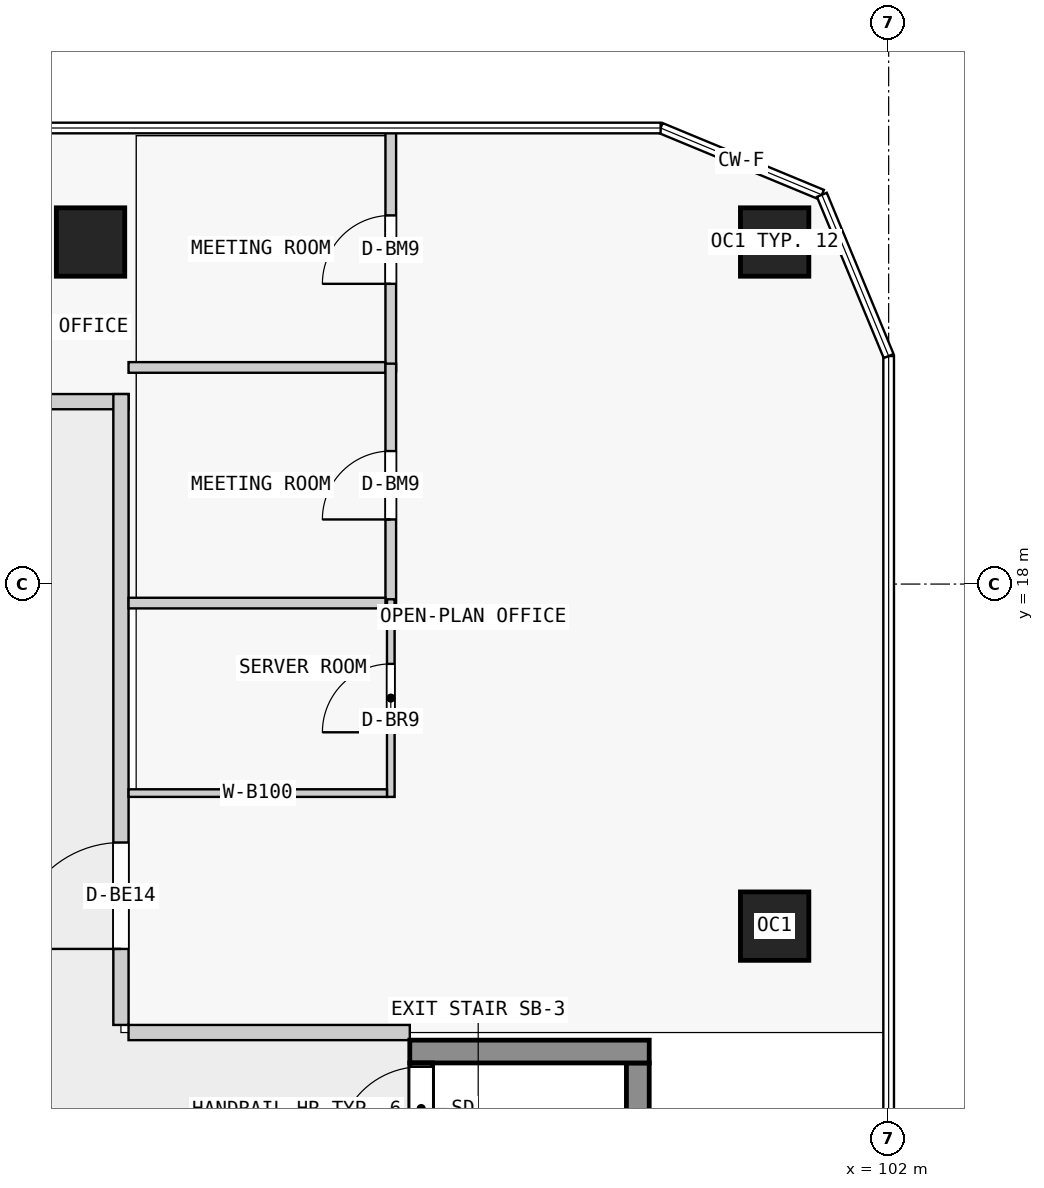
"""IFC4 building model, lengths in metres.
Left out: names, types, materials, properties, quantities, classifications, styles, units other than length and angle.
Written with IfcOpenShell. Run it as: python <this file> out.ifc"""

import sys

from ifc_helpers import new_model, si_unit, direction, frame, frame_2d, origin, origin_2d, place, context, subcontext, project, spatial, rectangle, extrude, element, fill, save


model = new_model("IFC4")
c1 = context("Model", 3, precision=1e-05, world=origin(), true_north=direction((0.0, 1.0)))
c2 = subcontext(c1, "Body", "Model", "MODEL_VIEW")
j1 = project(units=[si_unit("LENGTHUNIT", "METRE"), si_unit("PLANEANGLEUNIT", "RADIAN")], contexts=[c1])
p1 = place(None, origin())
s1 = spatial("IfcSite", under=j1, at=p1, CompositionType="ELEMENT")
p2 = place(p1, origin())
s2 = spatial("IfcBuilding", under=s1, at=p2, CompositionType="ELEMENT")
p3 = place(p2, frame((0.0, 0.0, 44.3)))
s3 = spatial("IfcBuildingStorey", under=s2, at=p3, CompositionType="ELEMENT", Elevation=44.3)
for number, where, z_axis, x_axis in (
    (1, (100.5, 13.5, 0.0), (0.0, 0.0, 1.0), (1.0, 0.0, 0.0)),
    (2, (100.5, 22.5, 0.0), (0.0, 0.0, 1.0), (1.0, 0.0, 0.0)),
    (3, (91.5, 22.5, 0.0), (0.0, 0.0, 1.0), (1.0, 0.0, 0.0)),
):
    element("IfcColumn", number, at=place(p3, frame(where, z_axis=z_axis, x_axis=x_axis)), inside=s3, PredefinedType="COLUMN", context=c2, shape_type="SweptSolid", body=[
        extrude(rectangle(XDim=0.9, YDim=0.9, at=origin_2d()), origin(), (0.0, 0.0, 1.0), 3.5),
    ])
p4 = place(p3, frame((95.85, 5.3, 0.0), z_axis=(0.0, 0.0, 1.0), x_axis=(0.0, 1.0, 0.0)))
e4 = element("IfcWall", 4, at=p4, inside=s3, PredefinedType="SHEAR", context=c2, shape_type="SweptSolid", body=[
    extrude(rectangle(XDim=6.4, YDim=0.3, at=frame_2d((3.2, 0.0))), origin(), (0.0, 0.0, 1.0), 3.25),
])
p5 = place(p4, frame((5.25, 0.0, 0.0)))
e5 = element("IfcOpeningElement", 5, at=p5, cuts=e4, PredefinedType="OPENING", context=c2, shape_type="SweptSolid", body=[
    extrude(rectangle(XDim=1.1, YDim=2.1, at=frame_2d((0.55, 1.05))), frame((0.0, 0.16, 0.0), z_axis=(0.0, -1.0, 0.0), x_axis=(1.0, 0.0, 0.0)), (0.0, 0.0, 1.0), 0.32),
])
p6 = place(p3, frame((98.7, 5.3, 0.0), z_axis=(0.0, 0.0, 1.0), x_axis=(0.0, 1.0, 0.0)))
e6 = element("IfcWall", 6, at=p6, inside=s3, PredefinedType="SHEAR", context=c2, shape_type="SweptSolid", body=[
    extrude(rectangle(XDim=6.4, YDim=0.3, at=frame_2d((3.2, 0.0))), origin(), (0.0, 0.0, 1.0), 3.25),
])
p7 = place(p3, frame((95.7, 11.85, 0.0), z_axis=(0.0, 0.0, 1.0), x_axis=(1.0, 0.0, 0.0)))
e7 = element("IfcWall", 7, at=p7, inside=s3, PredefinedType="SHEAR", context=c2, shape_type="SweptSolid", body=[
    extrude(rectangle(XDim=3.15, YDim=0.3, at=frame_2d((1.575, 0.0))), origin(), (0.0, 0.0, 1.0), 3.25),
])
p8 = place(p3, frame((72.0, 20.4, 0.0), z_axis=(0.0, 0.0, 1.0), x_axis=(1.0, 0.0, 0.0)))
e8 = element("IfcWall", 8, at=p8, inside=s3, PredefinedType="PARTITIONING", context=c2, shape_type="SweptSolid", body=[
    extrude(rectangle(XDim=20.0, YDim=0.2, at=frame_2d((10.0, 0.0))), origin(), (0.0, 0.0, 1.0), 3.25),
])
p9 = place(p3, frame((91.9, 12.2, 0.0), z_axis=(0.0, 0.0, 1.0), x_axis=(0.0, 1.0, 0.0)))
e9 = element("IfcWall", 9, at=p9, inside=s3, PredefinedType="PARTITIONING", context=c2, shape_type="SweptSolid", body=[
    extrude(rectangle(XDim=8.3, YDim=0.2, at=frame_2d((4.15, 0.0))), origin(), (0.0, 0.0, 1.0), 3.25),
])
p10 = place(p9, frame((1.0, 0.0, 0.0)))
e10 = element("IfcOpeningElement", 10, at=p10, cuts=e9, PredefinedType="OPENING", context=c2, shape_type="SweptSolid", body=[
    extrude(rectangle(XDim=1.4, YDim=2.4, at=frame_2d((0.7, 1.2))), frame((0.0, 0.11, 0.0), z_axis=(0.0, -1.0, 0.0), x_axis=(1.0, 0.0, 0.0)), (0.0, 0.0, 1.0), 0.22),
])
p11 = place(p3, frame((92.0, 12.1, 0.0), z_axis=(0.0, 0.0, 1.0), x_axis=(1.0, 0.0, 0.0)))
e11 = element("IfcWall", 11, at=p11, inside=s3, PredefinedType="PARTITIONING", context=c2, shape_type="SweptSolid", body=[
    extrude(rectangle(XDim=3.7, YDim=0.2, at=frame_2d((1.85, 0.0))), origin(), (0.0, 0.0, 1.0), 3.25),
])
p12 = place(p3, frame((95.45, 20.8, 0.0), z_axis=(0.0, 0.0, 1.0), x_axis=(0.0, 1.0, 0.0)))
e12 = element("IfcWall", 12, at=p12, inside=s3, PredefinedType="PARTITIONING", context=c2, shape_type="SweptSolid", body=[
    extrude(rectangle(XDim=3.2, YDim=0.14, at=frame_2d((1.6, 0.0))), origin(), (0.0, 0.0, 1.0), 3.25),
])
p13 = place(p12, frame((1.15, 0.0, 0.0)))
e13 = element("IfcOpeningElement", 13, at=p13, cuts=e12, PredefinedType="OPENING", context=c2, shape_type="SweptSolid", body=[
    extrude(rectangle(XDim=0.9, YDim=2.4, at=frame_2d((0.45, 1.2))), frame((0.0, 0.08, 0.0), z_axis=(0.0, -1.0, 0.0), x_axis=(1.0, 0.0, 0.0)), (0.0, 0.0, 1.0), 0.16),
])
p14 = place(p3, frame((92.0, 20.85, 0.0), z_axis=(0.0, 0.0, 1.0), x_axis=(1.0, 0.0, 0.0)))
e14 = element("IfcWall", 14, at=p14, inside=s3, PredefinedType="PARTITIONING", context=c2, shape_type="SweptSolid", body=[
    extrude(rectangle(XDim=3.38, YDim=0.14, at=frame_2d((1.69, 0.0))), origin(), (0.0, 0.0, 1.0), 3.25),
])
p15 = place(p3, frame((95.45, 17.7, 0.0), z_axis=(0.0, 0.0, 1.0), x_axis=(0.0, 1.0, 0.0)))
e15 = element("IfcWall", 15, at=p15, inside=s3, PredefinedType="PARTITIONING", context=c2, shape_type="SweptSolid", body=[
    extrude(rectangle(XDim=3.2, YDim=0.14, at=frame_2d((1.6, 0.0))), origin(), (0.0, 0.0, 1.0), 3.25),
])
p16 = place(p15, frame((1.15, 0.0, 0.0)))
e16 = element("IfcOpeningElement", 16, at=p16, cuts=e15, PredefinedType="OPENING", context=c2, shape_type="SweptSolid", body=[
    extrude(rectangle(XDim=0.9, YDim=2.4, at=frame_2d((0.45, 1.2))), frame((0.0, 0.08, 0.0), z_axis=(0.0, -1.0, 0.0), x_axis=(1.0, 0.0, 0.0)), (0.0, 0.0, 1.0), 0.16),
])
p17 = place(p3, frame((92.0, 17.75, 0.0), z_axis=(0.0, 0.0, 1.0), x_axis=(1.0, 0.0, 0.0)))
e17 = element("IfcWall", 17, at=p17, inside=s3, PredefinedType="PARTITIONING", context=c2, shape_type="SweptSolid", body=[
    extrude(rectangle(XDim=3.38, YDim=0.14, at=frame_2d((1.69, 0.0))), origin(), (0.0, 0.0, 1.0), 3.25),
])
p18 = place(p3, frame((95.45, 15.2, 0.0), z_axis=(0.0, 0.0, 1.0), x_axis=(0.0, 1.0, 0.0)))
e18 = element("IfcWall", 18, at=p18, inside=s3, PredefinedType="PARTITIONING", context=c2, shape_type="SweptSolid", body=[
    extrude(rectangle(XDim=2.6, YDim=0.1, at=frame_2d((1.3, 0.0))), origin(), (0.0, 0.0, 1.0), 3.25),
])
p19 = place(p18, frame((0.85, 0.0, 0.0)))
e19 = element("IfcOpeningElement", 19, at=p19, cuts=e18, PredefinedType="OPENING", context=c2, shape_type="SweptSolid", body=[
    extrude(rectangle(XDim=0.9, YDim=2.1, at=frame_2d((0.45, 1.05))), frame((0.0, 0.06, 0.0), z_axis=(0.0, -1.0, 0.0), x_axis=(1.0, 0.0, 0.0)), (0.0, 0.0, 1.0), 0.12),
])
p20 = place(p3, frame((92.0, 15.25, 0.0), z_axis=(0.0, 0.0, 1.0), x_axis=(1.0, 0.0, 0.0)))
e20 = element("IfcWall", 20, at=p20, inside=s3, PredefinedType="PARTITIONING", context=c2, shape_type="SweptSolid", body=[
    extrude(rectangle(XDim=3.4, YDim=0.1, at=frame_2d((1.7, 0.0))), origin(), (0.0, 0.0, 1.0), 3.25),
])
p21 = place(p5, origin())
e21 = element("IfcDoor", 21, at=p21, inside=s3, OperationType="SINGLE_SWING_LEFT", PredefinedType="DOOR", context=c2, shape_type="SweptSolid", body=[
    extrude(rectangle(XDim=1.1, YDim=2.1, at=frame_2d((0.55, 1.05))), frame((0.0, 0.025, 0.0), z_axis=(0.0, -1.0, 0.0), x_axis=(1.0, 0.0, 0.0)), (0.0, 0.0, 1.0), 0.05),
])
fill(e5, e21)
p22 = place(p10, origin())
e22 = element("IfcDoor", 22, at=p22, inside=s3, OperationType="DOUBLE_DOOR_SINGLE_SWING", PredefinedType="DOOR", context=c2, shape_type="SweptSolid", body=[
    extrude(rectangle(XDim=1.4, YDim=2.4, at=frame_2d((0.7, 1.2))), frame((0.0, 0.025, 0.0), z_axis=(0.0, -1.0, 0.0), x_axis=(1.0, 0.0, 0.0)), (0.0, 0.0, 1.0), 0.05),
])
fill(e10, e22)
p23 = place(p13, origin())
e23 = element("IfcDoor", 23, at=p23, inside=s3, OperationType="SINGLE_SWING_LEFT", PredefinedType="DOOR", context=c2, shape_type="SweptSolid", body=[
    extrude(rectangle(XDim=0.9, YDim=2.4, at=frame_2d((0.45, 1.2))), frame((0.0, 0.025, 0.0), z_axis=(0.0, -1.0, 0.0), x_axis=(1.0, 0.0, 0.0)), (0.0, 0.0, 1.0), 0.05),
])
fill(e13, e23)
p24 = place(p16, origin())
e24 = element("IfcDoor", 24, at=p24, inside=s3, OperationType="SINGLE_SWING_LEFT", PredefinedType="DOOR", context=c2, shape_type="SweptSolid", body=[
    extrude(rectangle(XDim=0.9, YDim=2.4, at=frame_2d((0.45, 1.2))), frame((0.0, 0.025, 0.0), z_axis=(0.0, -1.0, 0.0), x_axis=(1.0, 0.0, 0.0)), (0.0, 0.0, 1.0), 0.05),
])
fill(e16, e24)
p25 = place(p19, origin())
e25 = element("IfcDoor", 25, at=p25, inside=s3, OperationType="SINGLE_SWING_LEFT", PredefinedType="DOOR", context=c2, shape_type="SweptSolid", body=[
    extrude(rectangle(XDim=0.9, YDim=2.1, at=frame_2d((0.45, 1.05))), frame((0.0, 0.025, 0.0), z_axis=(0.0, -1.0, 0.0), x_axis=(1.0, 0.0, 0.0)), (0.0, 0.0, 1.0), 0.05),
])
fill(e19, e25)
save(model, sys.argv[1])
